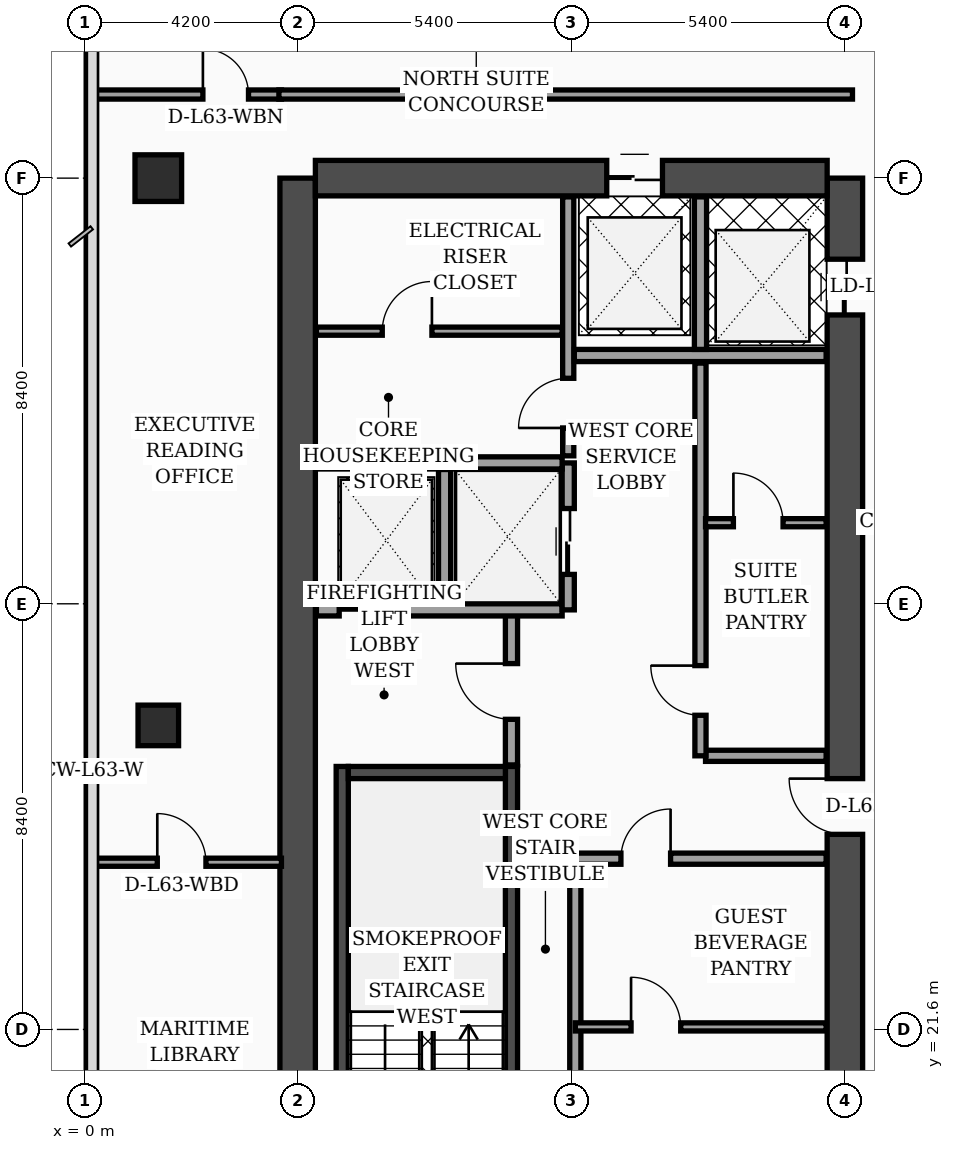
"""IFC4 building model, lengths in metres.
Left out: names, types, materials, properties, quantities, classifications, styles, units other than length and angle.
Written with IfcOpenShell. Run it as: python <this file> out.ifc"""

import sys

from ifc_helpers import new_model, si_unit, direction, frame, frame_2d, origin, origin_2d, place, context, subcontext, project, spatial, rectangle, extrude, element, fill, save


model = new_model("IFC4")
c1 = context("Model", 3, precision=1e-05, world=origin(), true_north=direction((0.0, 1.0)))
c2 = subcontext(c1, "Body", "Model", "MODEL_VIEW")
j1 = project(units=[si_unit("LENGTHUNIT", "METRE"), si_unit("PLANEANGLEUNIT", "RADIAN")], contexts=[c1])
p1 = place(None, origin())
s1 = spatial("IfcSite", under=j1, at=p1, CompositionType="ELEMENT")
p2 = place(p1, origin())
s2 = spatial("IfcBuilding", under=s1, at=p2, CompositionType="ELEMENT")
p3 = place(p2, frame((0.0, 0.0, 255.2)))
s3 = spatial("IfcBuildingStorey", under=s2, at=p3, CompositionType="ELEMENT", Elevation=255.2)
p4 = place(p3, frame((4.2, 16.8, 0.0), z_axis=(0.0, 0.0, 1.0), x_axis=(0.0, 1.0, 0.0)))
e1 = element("IfcWall", 1, at=p4, inside=s3, PredefinedType="SHEAR", context=c2, shape_type="SweptSolid", body=[
    extrude(rectangle(XDim=21.6, YDim=0.7, at=frame_2d((10.8, 0.0))), origin(), (0.0, 0.0, 1.0), 3.56),
])
p5 = place(p3, frame((15.0, 16.8, 0.0), z_axis=(0.0, 0.0, 1.0), x_axis=(0.0, 1.0, 0.0)))
e2 = element("IfcWall", 2, at=p5, inside=s3, PredefinedType="SHEAR", context=c2, shape_type="SweptSolid", body=[
    extrude(rectangle(XDim=21.6, YDim=0.7, at=frame_2d((10.8, 0.0))), origin(), (0.0, 0.0, 1.0), 3.56),
])
p6 = place(p5, frame((8.65, 0.0, 0.0)))
e3 = element("IfcOpeningElement", 3, at=p6, cuts=e2, PredefinedType="OPENING", context=c2, shape_type="SweptSolid", body=[
    extrude(rectangle(XDim=1.1, YDim=2.2, at=frame_2d((0.55, 1.1))), frame((0.0, 0.36, 0.0), z_axis=(0.0, -1.0, 0.0), x_axis=(1.0, 0.0, 0.0)), (0.0, 0.0, 1.0), 0.72),
])
p7 = place(p5, frame((18.9, 0.0, 0.0)))
e4 = element("IfcOpeningElement", 4, at=p7, cuts=e2, PredefinedType="OPENING", context=c2, shape_type="SweptSolid", body=[
    extrude(rectangle(XDim=1.1, YDim=2.2, at=frame_2d((0.55, 1.1))), frame((0.0, 0.36, 0.0), z_axis=(0.0, -1.0, 0.0), x_axis=(1.0, 0.0, 0.0)), (0.0, 0.0, 1.0), 0.72),
])
p8 = place(p3, frame((4.55, 38.4, 0.0), z_axis=(0.0, 0.0, 1.0), x_axis=(1.0, 0.0, 0.0)))
e5 = element("IfcWall", 5, at=p8, inside=s3, PredefinedType="SHEAR", context=c2, shape_type="SweptSolid", body=[
    extrude(rectangle(XDim=10.1, YDim=0.7, at=frame_2d((5.05, 0.0))), origin(), (0.0, 0.0, 1.0), 3.56),
])
p9 = place(p8, frame((5.75, 0.0, 0.0)))
e6 = element("IfcOpeningElement", 6, at=p9, cuts=e5, PredefinedType="OPENING", context=c2, shape_type="SweptSolid", body=[
    extrude(rectangle(XDim=1.1, YDim=2.2, at=frame_2d((0.55, 1.1))), frame((0.0, 0.36, 0.0), z_axis=(0.0, -1.0, 0.0), x_axis=(1.0, 0.0, 0.0)), (0.0, 0.0, 1.0), 0.72),
])
p10 = place(p3, frame((5.08, 17.15, 0.0), z_axis=(0.0, 0.0, 1.0), x_axis=(0.0, 1.0, 0.0)))
e7 = element("IfcWall", 7, at=p10, inside=s3, PredefinedType="SOLIDWALL", context=c2, shape_type="SweptSolid", body=[
    extrude(rectangle(XDim=9.64, YDim=0.24, at=frame_2d((4.82, 0.0))), origin(), (0.0, 0.0, 1.0), 3.56),
])
p11 = place(p3, frame((8.42, 17.15, 0.0), z_axis=(0.0, 0.0, 1.0), x_axis=(0.0, 1.0, 0.0)))
e8 = element("IfcWall", 8, at=p11, inside=s3, PredefinedType="SOLIDWALL", context=c2, shape_type="SweptSolid", body=[
    extrude(rectangle(XDim=9.64, YDim=0.24, at=frame_2d((4.82, 0.0))), origin(), (0.0, 0.0, 1.0), 3.56),
])
p12 = place(p11, frame((0.35, 0.0, 0.0)))
e9 = element("IfcOpeningElement", 9, at=p12, cuts=e8, PredefinedType="OPENING", context=c2, shape_type="SweptSolid", body=[
    extrude(rectangle(XDim=1.15, YDim=2.2, at=frame_2d((0.575, 1.1))), frame((0.0, 0.13, 0.0), z_axis=(0.0, -1.0, 0.0), x_axis=(1.0, 0.0, 0.0)), (0.0, 0.0, 1.0), 0.26),
])
p13 = place(p3, frame((5.2, 26.67, 0.0), z_axis=(0.0, 0.0, 1.0), x_axis=(1.0, 0.0, 0.0)))
e10 = element("IfcWall", 10, at=p13, inside=s3, PredefinedType="SOLIDWALL", context=c2, shape_type="SweptSolid", body=[
    extrude(rectangle(XDim=3.1, YDim=0.24, at=frame_2d((1.55, 0.0))), origin(), (0.0, 0.0, 1.0), 3.56),
])
p14 = place(p3, frame((1.45, 27.6, 0.0), z_axis=(0.0, 0.0, 1.0), x_axis=(1.0, 0.0, 0.0)))
e11 = element("IfcColumn", 11, at=p14, inside=s3, PredefinedType="COLUMN", context=c2, shape_type="SweptSolid", body=[
    extrude(rectangle(XDim=0.8, YDim=0.8, at=origin_2d()), origin(), (0.0, 0.0, 1.0), 3.56),
])
p15 = place(p3, frame((1.45, 38.4, 0.0), z_axis=(0.0, 0.0, 1.0), x_axis=(1.0, 0.0, 0.0)))
e12 = element("IfcColumn", 12, at=p15, inside=s3, PredefinedType="COLUMN", context=c2, shape_type="SweptSolid", body=[
    extrude(rectangle(XDim=0.92, YDim=0.92, at=origin_2d()), origin(), (0.0, 0.0, 1.0), 3.56),
])
p16 = place(p3, frame((8.42, 26.82, 0.0), z_axis=(0.0, 0.0, 1.0), x_axis=(0.0, 1.0, 0.0)))
e13 = element("IfcWall", 13, at=p16, inside=s3, PredefinedType="SOLIDWALL", context=c2, shape_type="SweptSolid", body=[
    extrude(rectangle(XDim=3.0, YDim=0.24, at=frame_2d((1.5, 0.0))), origin(), (0.0, 0.0, 1.0), 3.56),
])
p17 = place(p16, frame((0.9, 0.0, 0.0)))
e14 = element("IfcOpeningElement", 14, at=p17, cuts=e13, PredefinedType="OPENING", context=c2, shape_type="SweptSolid", body=[
    extrude(rectangle(XDim=1.1, YDim=2.2, at=frame_2d((0.55, 1.1))), frame((0.0, 0.13, 0.0), z_axis=(0.0, -1.0, 0.0), x_axis=(1.0, 0.0, 0.0)), (0.0, 0.0, 1.0), 0.26),
])
p18 = place(p3, frame((4.57, 29.88, 0.0), z_axis=(0.0, 0.0, 1.0), x_axis=(1.0, 0.0, 0.0)))
e15 = element("IfcWall", 15, at=p18, inside=s3, PredefinedType="SOLIDWALL", context=c2, shape_type="SweptSolid", body=[
    extrude(rectangle(XDim=4.85, YDim=0.24, at=frame_2d((2.425, 0.0))), origin(), (0.0, 0.0, 1.0), 3.56),
])
p19 = place(p18, frame((0.45, 0.0, 0.0)))
e16 = element("IfcOpeningElement", 16, at=p19, cuts=e15, PredefinedType="OPENING", context=c2, shape_type="SweptSolid", body=[
    extrude(rectangle(XDim=1.3, YDim=2.35, at=frame_2d((0.65, 1.175))), frame((0.0, 0.13, 0.0), z_axis=(0.0, -1.0, 0.0), x_axis=(1.0, 0.0, 0.0)), (0.0, 0.0, 1.0), 0.26),
])
p20 = place(p3, frame((7.1, 30.02, 0.0), z_axis=(0.0, 0.0, 1.0), x_axis=(0.0, 1.0, 0.0)))
e17 = element("IfcWall", 17, at=p20, inside=s3, PredefinedType="SOLIDWALL", context=c2, shape_type="SweptSolid", body=[
    extrude(rectangle(XDim=2.63, YDim=0.24, at=frame_2d((1.315, 0.0))), origin(), (0.0, 0.0, 1.0), 3.56),
])
p21 = place(p3, frame((9.54, 29.88, 0.0), z_axis=(0.0, 0.0, 1.0), x_axis=(0.0, 1.0, 0.0)))
e18 = element("IfcWall", 18, at=p21, inside=s3, PredefinedType="SOLIDWALL", context=c2, shape_type="SweptSolid", body=[
    extrude(rectangle(XDim=2.9, YDim=0.24, at=frame_2d((1.45, 0.0))), origin(), (0.0, 0.0, 1.0), 3.56),
])
p22 = place(p21, frame((0.7, 0.0, 0.0)))
e19 = element("IfcOpeningElement", 19, at=p22, cuts=e18, PredefinedType="OPENING", context=c2, shape_type="SweptSolid", body=[
    extrude(rectangle(XDim=1.3, YDim=2.35, at=frame_2d((0.65, 1.175))), frame((0.0, 0.13, 0.0), z_axis=(0.0, -1.0, 0.0), x_axis=(1.0, 0.0, 0.0)), (0.0, 0.0, 1.0), 0.26),
])
p23 = place(p3, frame((4.57, 32.78, 0.0), z_axis=(0.0, 0.0, 1.0), x_axis=(1.0, 0.0, 0.0)))
e20 = element("IfcWall", 20, at=p23, inside=s3, PredefinedType="SOLIDWALL", context=c2, shape_type="SweptSolid", body=[
    extrude(rectangle(XDim=4.85, YDim=0.24, at=frame_2d((2.425, 0.0))), origin(), (0.0, 0.0, 1.0), 3.19),
])
p24 = place(p3, frame((9.68, 17.17, 0.0), z_axis=(0.0, 0.0, 1.0), x_axis=(0.0, 1.0, 0.0)))
e21 = element("IfcWall", 21, at=p24, inside=s3, PredefinedType="SOLIDWALL", context=c2, shape_type="SweptSolid", body=[
    extrude(rectangle(XDim=7.83, YDim=0.22, at=frame_2d((3.915, 0.0))), origin(), (0.0, 0.0, 1.0), 3.56),
])
p25 = place(p3, frame((4.57, 35.38, 0.0), z_axis=(0.0, 0.0, 1.0), x_axis=(1.0, 0.0, 0.0)))
e22 = element("IfcWall", 22, at=p25, inside=s3, PredefinedType="PARTITIONING", context=c2, shape_type="SweptSolid", body=[
    extrude(rectangle(XDim=4.85, YDim=0.16, at=frame_2d((2.425, 0.0))), origin(), (0.0, 0.0, 1.0), 3.56),
])
p26 = place(p25, frame((1.3, 0.0, 0.0)))
e23 = element("IfcOpeningElement", 23, at=p26, cuts=e22, PredefinedType="OPENING", context=c2, shape_type="SweptSolid", body=[
    extrude(rectangle(XDim=0.98, YDim=2.15, at=frame_2d((0.49, 1.075))), frame((0.0, 0.09, 0.0), z_axis=(0.0, -1.0, 0.0), x_axis=(1.0, 0.0, 0.0)), (0.0, 0.0, 1.0), 0.18),
])
p27 = place(p3, frame((9.54, 32.92, 0.0), z_axis=(0.0, 0.0, 1.0), x_axis=(0.0, 1.0, 0.0)))
e24 = element("IfcWall", 24, at=p27, inside=s3, PredefinedType="SOLIDWALL", context=c2, shape_type="SweptSolid", body=[
    extrude(rectangle(XDim=5.11, YDim=0.22, at=frame_2d((2.555, 0.0))), origin(), (0.0, 0.0, 1.0), 3.56),
])
p28 = place(p27, frame((0.55, 0.0, 0.0)))
e25 = element("IfcOpeningElement", 25, at=p28, cuts=e24, PredefinedType="OPENING", context=c2, shape_type="SweptSolid", body=[
    extrude(rectangle(XDim=0.98, YDim=2.15, at=frame_2d((0.49, 1.075))), frame((0.0, 0.12, 0.0), z_axis=(0.0, -1.0, 0.0), x_axis=(1.0, 0.0, 0.0)), (0.0, 0.0, 1.0), 0.24),
])
p29 = place(p3, frame((9.68, 21.65, 0.0), z_axis=(0.0, 0.0, 1.0), x_axis=(1.0, 0.0, 0.0)))
e26 = element("IfcWall", 26, at=p29, inside=s3, PredefinedType="PARTITIONING", context=c2, shape_type="SweptSolid", body=[
    extrude(rectangle(XDim=4.95, YDim=0.16, at=frame_2d((2.475, 0.0))), origin(), (0.0, 0.0, 1.0), 3.09),
])
p30 = place(p29, frame((1.1, 0.0, 0.0)))
e27 = element("IfcOpeningElement", 27, at=p30, cuts=e26, PredefinedType="OPENING", context=c2, shape_type="SweptSolid", body=[
    extrude(rectangle(XDim=0.98, YDim=2.15, at=frame_2d((0.49, 1.075))), frame((0.0, 0.09, 0.0), z_axis=(0.0, -1.0, 0.0), x_axis=(1.0, 0.0, 0.0)), (0.0, 0.0, 1.0), 0.18),
])
p31 = place(p3, frame((9.68, 24.97, 0.0), z_axis=(0.0, 0.0, 1.0), x_axis=(1.0, 0.0, 0.0)))
e28 = element("IfcWall", 28, at=p31, inside=s3, PredefinedType="SOLIDWALL", context=c2, shape_type="SweptSolid", body=[
    extrude(rectangle(XDim=4.95, YDim=0.22, at=frame_2d((2.475, 0.0))), origin(), (0.0, 0.0, 1.0), 2.99),
])
p32 = place(p31, frame((0.9, 0.0, 0.0)))
e29 = element("IfcOpeningElement", 29, at=p32, cuts=e28, PredefinedType="OPENING", context=c2, shape_type="SweptSolid", body=[
    extrude(rectangle(XDim=0.98, YDim=2.15, at=frame_2d((0.49, 1.075))), frame((0.0, 0.12, 0.0), z_axis=(0.0, -1.0, 0.0), x_axis=(1.0, 0.0, 0.0)), (0.0, 0.0, 1.0), 0.24),
])
p33 = place(p3, frame((12.25, 27.0, 0.0), z_axis=(0.0, 0.0, 1.0), x_axis=(1.0, 0.0, 0.0)))
e30 = element("IfcWall", 30, at=p33, inside=s3, PredefinedType="SOLIDWALL", context=c2, shape_type="SweptSolid", body=[
    extrude(rectangle(XDim=2.38, YDim=0.22, at=frame_2d((1.19, 0.0))), origin(), (0.0, 0.0, 1.0), 3.56),
])
p34 = place(p3, frame((12.15, 27.0, 0.0), z_axis=(0.0, 0.0, 1.0), x_axis=(0.0, 1.0, 0.0)))
e31 = element("IfcWall", 31, at=p34, inside=s3, PredefinedType="SOLIDWALL", context=c2, shape_type="SweptSolid", body=[
    extrude(rectangle(XDim=7.75, YDim=0.22, at=frame_2d((3.875, 0.0))), origin(), (0.0, 0.0, 1.0), 3.56),
])
p35 = place(p34, frame((0.8, 0.0, 0.0)))
e32 = element("IfcOpeningElement", 32, at=p35, cuts=e31, PredefinedType="OPENING", context=c2, shape_type="SweptSolid", body=[
    extrude(rectangle(XDim=0.98, YDim=2.15, at=frame_2d((0.49, 1.075))), frame((0.0, 0.12, 0.0), z_axis=(0.0, -1.0, 0.0), x_axis=(1.0, 0.0, 0.0)), (0.0, 0.0, 1.0), 0.24),
])
p36 = place(p3, frame((12.25, 31.6, 0.0), z_axis=(0.0, 0.0, 1.0), x_axis=(1.0, 0.0, 0.0)))
e33 = element("IfcWall", 33, at=p36, inside=s3, PredefinedType="PARTITIONING", context=c2, shape_type="SweptSolid", body=[
    extrude(rectangle(XDim=2.38, YDim=0.16, at=frame_2d((1.19, 0.0))), origin(), (0.0, 0.0, 1.0), 3.14),
])
p37 = place(p36, frame((0.55, 0.0, 0.0)))
e34 = element("IfcOpeningElement", 34, at=p37, cuts=e33, PredefinedType="OPENING", context=c2, shape_type="SweptSolid", body=[
    extrude(rectangle(XDim=0.98, YDim=2.15, at=frame_2d((0.49, 1.075))), frame((0.0, 0.09, 0.0), z_axis=(0.0, -1.0, 0.0), x_axis=(1.0, 0.0, 0.0)), (0.0, 0.0, 1.0), 0.18),
])
p38 = place(p3, frame((9.66, 34.9, 0.0), z_axis=(0.0, 0.0, 1.0), x_axis=(1.0, 0.0, 0.0)))
e35 = element("IfcWall", 35, at=p38, inside=s3, PredefinedType="SOLIDWALL", context=c2, shape_type="SweptSolid", body=[
    extrude(rectangle(XDim=4.97, YDim=0.24, at=frame_2d((2.485, 0.0))), origin(), (0.0, 0.0, 1.0), 3.56),
])
p39 = place(p3, frame((12.15, 35.02, 0.0), z_axis=(0.0, 0.0, 1.0), x_axis=(0.0, 1.0, 0.0)))
e36 = element("IfcWall", 36, at=p39, inside=s3, PredefinedType="SOLIDWALL", context=c2, shape_type="SweptSolid", body=[
    extrude(rectangle(XDim=3.01, YDim=0.24, at=frame_2d((1.505, 0.0))), origin(), (0.0, 0.0, 1.0), 3.56),
])
p40 = place(p3, frame((0.08, 24.9, 0.0), z_axis=(0.0, 0.0, 1.0), x_axis=(1.0, 0.0, 0.0)))
e37 = element("IfcWall", 37, at=p40, inside=s3, PredefinedType="PARTITIONING", context=c2, shape_type="SweptSolid", body=[
    extrude(rectangle(XDim=3.8, YDim=0.16, at=frame_2d((1.9, 0.0))), origin(), (0.0, 0.0, 1.0), 3.09),
])
p41 = place(p40, frame((1.35, 0.0, 0.0)))
e38 = element("IfcOpeningElement", 38, at=p41, cuts=e37, PredefinedType="OPENING", context=c2, shape_type="SweptSolid", body=[
    extrude(rectangle(XDim=0.96, YDim=2.2, at=frame_2d((0.48, 1.1))), frame((0.0, 0.09, 0.0), z_axis=(0.0, -1.0, 0.0), x_axis=(1.0, 0.0, 0.0)), (0.0, 0.0, 1.0), 0.18),
])
p42 = place(p3, frame((0.08, 40.05, 0.0), z_axis=(0.0, 0.0, 1.0), x_axis=(1.0, 0.0, 0.0)))
e39 = element("IfcWall", 39, at=p42, inside=s3, PredefinedType="PARTITIONING", context=c2, shape_type="SweptSolid", body=[
    extrude(rectangle(XDim=3.8, YDim=0.18, at=frame_2d((1.9, 0.0))), origin(), (0.0, 0.0, 1.0), 2.99),
])
p43 = place(p42, frame((2.25, 0.0, 0.0)))
e40 = element("IfcOpeningElement", 40, at=p43, cuts=e39, PredefinedType="OPENING", context=c2, shape_type="SweptSolid", body=[
    extrude(rectangle(XDim=0.9, YDim=2.15, at=frame_2d((0.45, 1.075))), frame((0.0, 0.1, 0.0), z_axis=(0.0, -1.0, 0.0), x_axis=(1.0, 0.0, 0.0)), (0.0, 0.0, 1.0), 0.2),
])
p44 = place(p3, frame((3.83, 40.05, 0.0), z_axis=(0.0, 0.0, 1.0), x_axis=(1.0, 0.0, 0.0)))
e41 = element("IfcWall", 41, at=p44, inside=s3, PredefinedType="PARTITIONING", context=c2, shape_type="SweptSolid", body=[
    extrude(rectangle(XDim=11.32, YDim=0.18, at=frame_2d((5.66, 0.0))), origin(), (0.0, 0.0, 1.0), 2.99),
])
p45 = place(p17, origin())
e42 = element("IfcDoor", 42, at=p45, inside=s3, OperationType="SINGLE_SWING_RIGHT", PredefinedType="DOOR", context=c2, shape_type="SweptSolid", body=[
    extrude(rectangle(XDim=1.1, YDim=2.2, at=frame_2d((0.55, 1.1))), frame((0.0, 0.025, 0.0), z_axis=(0.0, -1.0, 0.0), x_axis=(1.0, 0.0, 0.0)), (0.0, 0.0, 1.0), 0.05),
])
fill(e14, e42)
p46 = place(p19, origin())
e43 = element("IfcDoor", 43, at=p46, inside=s3, OperationType="DOUBLE_DOOR_SLIDING", PredefinedType="DOOR", context=c2, shape_type="SweptSolid", body=[
    extrude(rectangle(XDim=1.3, YDim=2.35, at=frame_2d((0.65, 1.175))), frame((0.0, 0.025, 0.0), z_axis=(0.0, -1.0, 0.0), x_axis=(1.0, 0.0, 0.0)), (0.0, 0.0, 1.0), 0.05),
])
fill(e16, e43)
p47 = place(p22, origin())
e44 = element("IfcDoor", 44, at=p47, inside=s3, OperationType="DOUBLE_DOOR_SLIDING", PredefinedType="DOOR", context=c2, shape_type="SweptSolid", body=[
    extrude(rectangle(XDim=1.3, YDim=2.35, at=frame_2d((0.65, 1.175))), frame((0.0, 0.025, 0.0), z_axis=(0.0, -1.0, 0.0), x_axis=(1.0, 0.0, 0.0)), (0.0, 0.0, 1.0), 0.05),
])
fill(e19, e44)
p48 = place(p26, origin())
e45 = element("IfcDoor", 45, at=p48, inside=s3, OperationType="SINGLE_SWING_RIGHT", PredefinedType="DOOR", context=c2, shape_type="SweptSolid", body=[
    extrude(rectangle(XDim=0.98, YDim=2.15, at=frame_2d((0.49, 1.075))), frame((0.0, 0.025, 0.0), z_axis=(0.0, -1.0, 0.0), x_axis=(1.0, 0.0, 0.0)), (0.0, 0.0, 1.0), 0.05),
])
fill(e23, e45)
p49 = place(p28, origin())
e46 = element("IfcDoor", 46, at=p49, inside=s3, OperationType="SINGLE_SWING_LEFT", PredefinedType="DOOR", context=c2, shape_type="SweptSolid", body=[
    extrude(rectangle(XDim=0.98, YDim=2.15, at=frame_2d((0.49, 1.075))), frame((0.0, 0.025, 0.0), z_axis=(0.0, -1.0, 0.0), x_axis=(1.0, 0.0, 0.0)), (0.0, 0.0, 1.0), 0.05),
])
fill(e25, e46)
p50 = place(p30, origin())
e47 = element("IfcDoor", 47, at=p50, inside=s3, OperationType="SINGLE_SWING_LEFT", PredefinedType="DOOR", context=c2, shape_type="SweptSolid", body=[
    extrude(rectangle(XDim=0.98, YDim=2.15, at=frame_2d((0.49, 1.075))), frame((0.0, 0.025, 0.0), z_axis=(0.0, -1.0, 0.0), x_axis=(1.0, 0.0, 0.0)), (0.0, 0.0, 1.0), 0.05),
])
fill(e27, e47)
p51 = place(p32, origin())
e48 = element("IfcDoor", 48, at=p51, inside=s3, OperationType="SINGLE_SWING_RIGHT", PredefinedType="DOOR", context=c2, shape_type="SweptSolid", body=[
    extrude(rectangle(XDim=0.98, YDim=2.15, at=frame_2d((0.49, 1.075))), frame((0.0, 0.025, 0.0), z_axis=(0.0, -1.0, 0.0), x_axis=(1.0, 0.0, 0.0)), (0.0, 0.0, 1.0), 0.05),
])
fill(e29, e48)
p52 = place(p35, origin())
e49 = element("IfcDoor", 49, at=p52, inside=s3, OperationType="SINGLE_SWING_RIGHT", PredefinedType="DOOR", context=c2, shape_type="SweptSolid", body=[
    extrude(rectangle(XDim=0.98, YDim=2.15, at=frame_2d((0.49, 1.075))), frame((0.0, 0.025, 0.0), z_axis=(0.0, -1.0, 0.0), x_axis=(1.0, 0.0, 0.0)), (0.0, 0.0, 1.0), 0.05),
])
fill(e32, e49)
p53 = place(p37, origin())
e50 = element("IfcDoor", 50, at=p53, inside=s3, OperationType="SINGLE_SWING_LEFT", PredefinedType="DOOR", context=c2, shape_type="SweptSolid", body=[
    extrude(rectangle(XDim=0.98, YDim=2.15, at=frame_2d((0.49, 1.075))), frame((0.0, 0.025, 0.0), z_axis=(0.0, -1.0, 0.0), x_axis=(1.0, 0.0, 0.0)), (0.0, 0.0, 1.0), 0.05),
])
fill(e34, e50)
p54 = place(p41, origin())
e51 = element("IfcDoor", 51, at=p54, inside=s3, OperationType="SINGLE_SWING_LEFT", PredefinedType="DOOR", context=c2, shape_type="SweptSolid", body=[
    extrude(rectangle(XDim=0.96, YDim=2.2, at=frame_2d((0.48, 1.1))), frame((0.0, 0.025, 0.0), z_axis=(0.0, -1.0, 0.0), x_axis=(1.0, 0.0, 0.0)), (0.0, 0.0, 1.0), 0.05),
])
fill(e38, e51)
p55 = place(p43, origin())
e52 = element("IfcDoor", 52, at=p55, inside=s3, OperationType="SINGLE_SWING_LEFT", PredefinedType="DOOR", context=c2, shape_type="SweptSolid", body=[
    extrude(rectangle(XDim=0.9, YDim=2.15, at=frame_2d((0.45, 1.075))), frame((0.0, 0.025, 0.0), z_axis=(0.0, -1.0, 0.0), x_axis=(1.0, 0.0, 0.0)), (0.0, 0.0, 1.0), 0.05),
])
fill(e40, e52)
p56 = place(p6, origin())
e53 = element("IfcDoor", 53, at=p56, inside=s3, OperationType="SINGLE_SWING_RIGHT", PredefinedType="DOOR", context=c2, shape_type="SweptSolid", body=[
    extrude(rectangle(XDim=1.1, YDim=2.2, at=frame_2d((0.55, 1.1))), frame((0.0, 0.025, 0.0), z_axis=(0.0, -1.0, 0.0), x_axis=(1.0, 0.0, 0.0)), (0.0, 0.0, 1.0), 0.05),
])
fill(e3, e53)
p57 = place(p7, origin())
e54 = element("IfcDoor", 54, at=p57, inside=s3, OperationType="DOUBLE_DOOR_SLIDING", PredefinedType="DOOR", context=c2, shape_type="SweptSolid", body=[
    extrude(rectangle(XDim=1.1, YDim=2.2, at=frame_2d((0.55, 1.1))), frame((0.0, 0.025, 0.0), z_axis=(0.0, -1.0, 0.0), x_axis=(1.0, 0.0, 0.0)), (0.0, 0.0, 1.0), 0.05),
])
fill(e4, e54)
p58 = place(p9, origin())
e55 = element("IfcDoor", 55, at=p58, inside=s3, OperationType="DOUBLE_DOOR_SLIDING", PredefinedType="DOOR", context=c2, shape_type="SweptSolid", body=[
    extrude(rectangle(XDim=1.1, YDim=2.2, at=frame_2d((0.55, 1.1))), frame((0.0, 0.025, 0.0), z_axis=(0.0, -1.0, 0.0), x_axis=(1.0, 0.0, 0.0)), (0.0, 0.0, 1.0), 0.05),
])
fill(e6, e55)
save(model, sys.argv[1])
